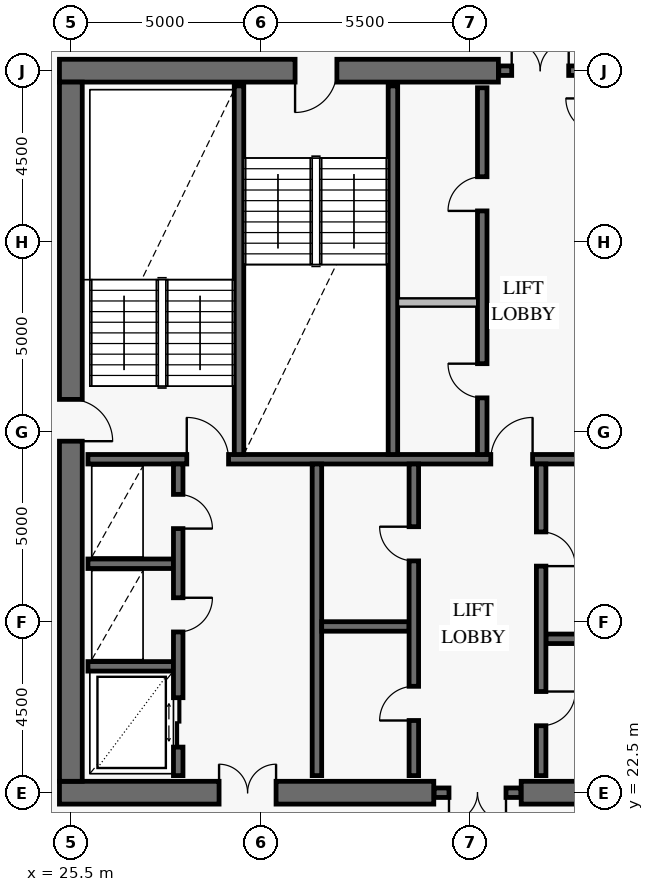
"""IFC4 building model, lengths in metres.
Left out: names, types, materials, properties, quantities, classifications, styles, units other than length and angle.
Written with IfcOpenShell. Run it as: python <this file> out.ifc"""

import sys

from ifc_helpers import new_model, si_unit, direction, frame, frame_2d, origin, place, context, subcontext, project, spatial, rectangle, extrude, element, fill, save


model = new_model("IFC4")
c1 = context("Model", 3, precision=1e-05, world=origin(), true_north=direction((0.0, 1.0)))
c2 = subcontext(c1, "Body", "Model", "MODEL_VIEW")
j1 = project(units=[si_unit("LENGTHUNIT", "METRE"), si_unit("PLANEANGLEUNIT", "RADIAN")], contexts=[c1])
p1 = place(None, origin())
s1 = spatial("IfcSite", under=j1, at=p1, CompositionType="ELEMENT")
p2 = place(p1, origin())
s2 = spatial("IfcBuilding", under=s1, at=p2, CompositionType="ELEMENT")
p3 = place(p2, frame((0.0, 0.0, 276.8)))
s3 = spatial("IfcBuildingStorey", under=s2, at=p3, CompositionType="ELEMENT", Elevation=276.8)
p4 = place(p3, frame((25.2, 22.5, 0.0), z_axis=(0.0, 0.0, 1.0), x_axis=(1.0, 0.0, 0.0)))
e1 = element("IfcWall", 1, at=p4, inside=s3, PredefinedType="SHEAR", context=c2, shape_type="SweptSolid", body=[
    extrude(rectangle(XDim=9.85, YDim=0.6, at=frame_2d((4.925, 0.0))), origin(), (0.0, 0.0, 1.0), 3.8),
])
p5 = place(p4, frame((4.2, 0.0, 0.0)))
e2 = element("IfcOpeningElement", 2, at=p5, cuts=e1, PredefinedType="OPENING", context=c2, shape_type="SweptSolid", body=[
    extrude(rectangle(XDim=1.5, YDim=2.15, at=frame_2d((0.75, 1.075))), frame((0.0, 0.312, 0.0), z_axis=(0.0, -1.0, 0.0), x_axis=(1.0, 0.0, 0.0)), (0.0, 0.0, 1.0), 0.624),
])
p6 = place(p3, frame((37.35, 22.5, 0.0), z_axis=(0.0, 0.0, 1.0), x_axis=(1.0, 0.0, 0.0)))
e3 = element("IfcWall", 3, at=p6, inside=s3, PredefinedType="SHEAR", context=c2, shape_type="SweptSolid", body=[
    extrude(rectangle(XDim=9.45, YDim=0.6, at=frame_2d((4.725, 0.0))), origin(), (0.0, 0.0, 1.0), 3.8),
])
p7 = place(p6, frame((3.95, 0.0, 0.0)))
e4 = element("IfcOpeningElement", 4, at=p7, cuts=e3, PredefinedType="OPENING", context=c2, shape_type="SweptSolid", body=[
    extrude(rectangle(XDim=1.5, YDim=2.15, at=frame_2d((0.75, 1.075))), frame((0.0, 0.312, 0.0), z_axis=(0.0, -1.0, 0.0), x_axis=(1.0, 0.0, 0.0)), (0.0, 0.0, 1.0), 0.624),
])
p8 = place(p3, frame((36.75, 41.5, 0.0), z_axis=(0.0, 0.0, 1.0), x_axis=(-1.0, 0.0, 0.0)))
e5 = element("IfcWall", 5, at=p8, inside=s3, PredefinedType="SHEAR", context=c2, shape_type="SweptSolid", body=[
    extrude(rectangle(XDim=11.55, YDim=0.6, at=frame_2d((5.775, 0.0))), origin(), (0.0, 0.0, 1.0), 3.8),
])
p9 = place(p8, frame((4.25, 0.0, 0.0)))
e6 = element("IfcOpeningElement", 6, at=p9, cuts=e5, PredefinedType="OPENING", context=c2, shape_type="SweptSolid", body=[
    extrude(rectangle(XDim=1.1, YDim=2.15, at=frame_2d((0.55, 1.075))), frame((0.0, 0.312, 0.0), z_axis=(0.0, -1.0, 0.0), x_axis=(1.0, 0.0, 0.0)), (0.0, 0.0, 1.0), 0.624),
])
p10 = place(p3, frame((25.5, 22.8, 0.0), z_axis=(0.0, 0.0, 1.0), x_axis=(0.0, 1.0, 0.0)))
e7 = element("IfcWall", 7, at=p10, inside=s3, PredefinedType="SHEAR", context=c2, shape_type="SweptSolid", body=[
    extrude(rectangle(XDim=18.4, YDim=0.6, at=frame_2d((9.2, 0.0))), origin(), (0.0, 0.0, 1.0), 3.8),
])
p11 = place(p10, frame((8.95, 0.0, 0.0)))
e8 = element("IfcOpeningElement", 8, at=p11, cuts=e7, PredefinedType="OPENING", context=c2, shape_type="SweptSolid", body=[
    extrude(rectangle(XDim=1.1, YDim=2.15, at=frame_2d((0.55, 1.075))), frame((0.0, 0.312, 0.0), z_axis=(0.0, -1.0, 0.0), x_axis=(1.0, 0.0, 0.0)), (0.0, 0.0, 1.0), 0.624),
])
p12 = place(p3, frame((35.06, 22.5, 0.0), z_axis=(0.0, 0.0, 1.0), x_axis=(1.0, 0.0, 0.0)))
e9 = element("IfcWall", 9, at=p12, inside=s3, PredefinedType="SOLIDWALL", context=c2, shape_type="SweptSolid", body=[
    extrude(rectangle(XDim=2.28, YDim=0.25, at=frame_2d((1.14, 0.0))), origin(), (0.0, 0.0, 1.0), 3.8),
])
p13 = place(p12, frame((0.39, 0.0, 0.0)))
e10 = element("IfcOpeningElement", 10, at=p13, cuts=e9, PredefinedType="OPENING", context=c2, shape_type="SweptSolid", body=[
    extrude(rectangle(XDim=1.5, YDim=2.15, at=frame_2d((0.75, 1.075))), frame((0.0, 0.137, 0.0), z_axis=(0.0, -1.0, 0.0), x_axis=(1.0, 0.0, 0.0)), (0.0, 0.0, 1.0), 0.274),
])
p14 = place(p3, frame((36.76, 41.5, 0.0), z_axis=(0.0, 0.0, 1.0), x_axis=(1.0, 0.0, 0.0)))
e11 = element("IfcWall", 11, at=p14, inside=s3, PredefinedType="SOLIDWALL", context=c2, shape_type="SweptSolid", body=[
    extrude(rectangle(XDim=2.18, YDim=0.25, at=frame_2d((1.09, 0.0))), origin(), (0.0, 0.0, 1.0), 3.8),
])
p15 = place(p14, frame((0.34, 0.0, 0.0)))
e12 = element("IfcOpeningElement", 12, at=p15, cuts=e11, PredefinedType="OPENING", context=c2, shape_type="SweptSolid", body=[
    extrude(rectangle(XDim=1.5, YDim=2.15, at=frame_2d((0.75, 1.075))), frame((0.0, 0.137, 0.0), z_axis=(0.0, -1.0, 0.0), x_axis=(1.0, 0.0, 0.0)), (0.0, 0.0, 1.0), 0.274),
])
p16 = place(p3, frame((25.95, 31.275, 0.0), z_axis=(0.0, 0.0, 1.0), x_axis=(1.0, 0.0, 0.0)))
e13 = element("IfcWall", 13, at=p16, inside=s3, PredefinedType="SOLIDWALL", context=c2, shape_type="SweptSolid", body=[
    extrude(rectangle(XDim=20.1, YDim=0.25, at=frame_2d((10.05, 0.0))), origin(), (0.0, 0.0, 1.0), 3.8),
])
p17 = place(p16, frame((2.6, 0.0, 0.0)))
e14 = element("IfcOpeningElement", 14, at=p17, cuts=e13, PredefinedType="OPENING", context=c2, shape_type="SweptSolid", body=[
    extrude(rectangle(XDim=1.1, YDim=2.15, at=frame_2d((0.55, 1.075))), frame((0.0, 0.137, 0.0), z_axis=(0.0, -1.0, 0.0), x_axis=(1.0, 0.0, 0.0)), (0.0, 0.0, 1.0), 0.274),
])
p18 = place(p16, frame((10.6, 0.0, 0.0)))
e15 = element("IfcOpeningElement", 15, at=p18, cuts=e13, PredefinedType="OPENING", context=c2, shape_type="SweptSolid", body=[
    extrude(rectangle(XDim=1.1, YDim=2.15, at=frame_2d((0.55, 1.075))), frame((0.0, 0.137, 0.0), z_axis=(0.0, -1.0, 0.0), x_axis=(1.0, 0.0, 0.0)), (0.0, 0.0, 1.0), 0.274),
])
p19 = place(p16, frame((16.35, 0.0, 0.0)))
e16 = element("IfcOpeningElement", 16, at=p19, cuts=e13, PredefinedType="OPENING", context=c2, shape_type="SweptSolid", body=[
    extrude(rectangle(XDim=1.1, YDim=2.15, at=frame_2d((0.55, 1.075))), frame((0.0, 0.137, 0.0), z_axis=(0.0, -1.0, 0.0), x_axis=(1.0, 0.0, 0.0)), (0.0, 0.0, 1.0), 0.274),
])
for number, where, z_axis, x_axis in (
    (17, (29.925, 31.4, 0.0), (0.0, 0.0, 1.0), (0.0, 1.0, 0.0)),
    (18, (33.975, 31.4, 0.0), (0.0, 0.0, 1.0), (0.0, 1.0, 0.0)),
):
    element("IfcWall", number, at=place(p3, frame(where, z_axis=z_axis, x_axis=x_axis)), inside=s3, PredefinedType="SOLIDWALL", context=c2, shape_type="SweptSolid", body=[
        extrude(rectangle(XDim=9.7, YDim=0.25, at=frame_2d((4.85, 0.0))), origin(), (0.0, 0.0, 1.0), 3.8),
    ])
p20 = place(p3, frame((36.325, 31.4, 0.0), z_axis=(0.0, 0.0, 1.0), x_axis=(0.0, 1.0, 0.0)))
e19 = element("IfcWall", 19, at=p20, inside=s3, PredefinedType="SOLIDWALL", context=c2, shape_type="SweptSolid", body=[
    extrude(rectangle(XDim=9.65, YDim=0.25, at=frame_2d((4.825, 0.0))), origin(), (0.0, 0.0, 1.0), 3.8),
])
p21 = place(p20, frame((1.49, 0.0, 0.0)))
e20 = element("IfcOpeningElement", 20, at=p21, cuts=e19, PredefinedType="OPENING", context=c2, shape_type="SweptSolid", body=[
    extrude(rectangle(XDim=0.9, YDim=2.1, at=frame_2d((0.45, 1.05))), frame((0.0, 0.137, 0.0), z_axis=(0.0, -1.0, 0.0), x_axis=(1.0, 0.0, 0.0)), (0.0, 0.0, 1.0), 0.274),
])
p22 = place(p20, frame((6.41, 0.0, 0.0)))
e21 = element("IfcOpeningElement", 21, at=p22, cuts=e19, PredefinedType="OPENING", context=c2, shape_type="SweptSolid", body=[
    extrude(rectangle(XDim=0.9, YDim=2.1, at=frame_2d((0.45, 1.05))), frame((0.0, 0.137, 0.0), z_axis=(0.0, -1.0, 0.0), x_axis=(1.0, 0.0, 0.0)), (0.0, 0.0, 1.0), 0.274),
])
for number, where, z_axis, x_axis in (
    (22, (25.95, 25.825, 0.0), (0.0, 0.0, 1.0), (1.0, 0.0, 0.0)),
    (23, (25.95, 28.525, 0.0), (0.0, 0.0, 1.0), (1.0, 0.0, 0.0)),
):
    element("IfcWall", number, at=place(p3, frame(where, z_axis=z_axis, x_axis=x_axis)), inside=s3, PredefinedType="SOLIDWALL", context=c2, shape_type="SweptSolid", body=[
        extrude(rectangle(XDim=2.25, YDim=0.25, at=frame_2d((1.125, 0.0))), origin(), (0.0, 0.0, 1.0), 3.8),
    ])
p23 = place(p3, frame((28.325, 22.95, 0.0), z_axis=(0.0, 0.0, 1.0), x_axis=(0.0, 1.0, 0.0)))
e24 = element("IfcWall", 24, at=p23, inside=s3, PredefinedType="SOLIDWALL", context=c2, shape_type="SweptSolid", body=[
    extrude(rectangle(XDim=8.2, YDim=0.25, at=frame_2d((4.1, 0.0))), origin(), (0.0, 0.0, 1.0), 3.8),
])
p24 = place(p23, frame((0.75, 0.0, 0.0)))
e25 = element("IfcOpeningElement", 25, at=p24, cuts=e24, PredefinedType="OPENING", context=c2, shape_type="SweptSolid", body=[
    extrude(rectangle(XDim=1.3, YDim=2.3, at=frame_2d((0.65, 1.15))), frame((0.0, 0.137, 0.0), z_axis=(0.0, -1.0, 0.0), x_axis=(1.0, 0.0, 0.0)), (0.0, 0.0, 1.0), 0.274),
])
p25 = place(p23, frame((3.78, 0.0, 0.0)))
e26 = element("IfcOpeningElement", 26, at=p25, cuts=e24, PredefinedType="OPENING", context=c2, shape_type="SweptSolid", body=[
    extrude(rectangle(XDim=0.9, YDim=2.1, at=frame_2d((0.45, 1.05))), frame((0.0, 0.137, 0.0), z_axis=(0.0, -1.0, 0.0), x_axis=(1.0, 0.0, 0.0)), (0.0, 0.0, 1.0), 0.274),
])
p26 = place(p23, frame((6.5, 0.0, 0.0)))
e27 = element("IfcOpeningElement", 27, at=p26, cuts=e24, PredefinedType="OPENING", context=c2, shape_type="SweptSolid", body=[
    extrude(rectangle(XDim=0.9, YDim=2.1, at=frame_2d((0.45, 1.05))), frame((0.0, 0.137, 0.0), z_axis=(0.0, -1.0, 0.0), x_axis=(1.0, 0.0, 0.0)), (0.0, 0.0, 1.0), 0.274),
])
p27 = place(p3, frame((31.975, 22.95, 0.0), z_axis=(0.0, 0.0, 1.0), x_axis=(0.0, 1.0, 0.0)))
e28 = element("IfcWall", 28, at=p27, inside=s3, PredefinedType="SOLIDWALL", context=c2, shape_type="SweptSolid", body=[
    extrude(rectangle(XDim=8.2, YDim=0.25, at=frame_2d((4.1, 0.0))), origin(), (0.0, 0.0, 1.0), 3.8),
])
p28 = place(p3, frame((32.1, 26.875, 0.0), z_axis=(0.0, 0.0, 1.0), x_axis=(1.0, 0.0, 0.0)))
e29 = element("IfcWall", 29, at=p28, inside=s3, PredefinedType="SOLIDWALL", context=c2, shape_type="SweptSolid", body=[
    extrude(rectangle(XDim=2.3, YDim=0.25, at=frame_2d((1.15, 0.0))), origin(), (0.0, 0.0, 1.0), 3.8),
])
p29 = place(p3, frame((34.525, 22.95, 0.0), z_axis=(0.0, 0.0, 1.0), x_axis=(0.0, 1.0, 0.0)))
e30 = element("IfcWall", 30, at=p29, inside=s3, PredefinedType="SOLIDWALL", context=c2, shape_type="SweptSolid", body=[
    extrude(rectangle(XDim=8.2, YDim=0.25, at=frame_2d((4.1, 0.0))), origin(), (0.0, 0.0, 1.0), 3.8),
])
p30 = place(p29, frame((1.45, 0.0, 0.0)))
e31 = element("IfcOpeningElement", 31, at=p30, cuts=e30, PredefinedType="OPENING", context=c2, shape_type="SweptSolid", body=[
    extrude(rectangle(XDim=0.9, YDim=2.1, at=frame_2d((0.45, 1.05))), frame((0.0, 0.137, 0.0), z_axis=(0.0, -1.0, 0.0), x_axis=(1.0, 0.0, 0.0)), (0.0, 0.0, 1.0), 0.274),
])
p31 = place(p29, frame((5.65, 0.0, 0.0)))
e32 = element("IfcOpeningElement", 32, at=p31, cuts=e30, PredefinedType="OPENING", context=c2, shape_type="SweptSolid", body=[
    extrude(rectangle(XDim=0.9, YDim=2.1, at=frame_2d((0.45, 1.05))), frame((0.0, 0.137, 0.0), z_axis=(0.0, -1.0, 0.0), x_axis=(1.0, 0.0, 0.0)), (0.0, 0.0, 1.0), 0.274),
])
p32 = place(p3, frame((38.0, 26.55, 0.0), z_axis=(0.0, 0.0, 1.0), x_axis=(1.0, 0.0, 0.0)))
e33 = element("IfcWall", 33, at=p32, inside=s3, PredefinedType="SOLIDWALL", context=c2, shape_type="SweptSolid", body=[
    extrude(rectangle(XDim=2.3, YDim=0.25, at=frame_2d((1.15, 0.0))), origin(), (0.0, 0.0, 1.0), 3.8),
])
p33 = place(p3, frame((37.875, 22.95, 0.0), z_axis=(0.0, 0.0, 1.0), x_axis=(0.0, 1.0, 0.0)))
e34 = element("IfcWall", 34, at=p33, inside=s3, PredefinedType="SOLIDWALL", context=c2, shape_type="SweptSolid", body=[
    extrude(rectangle(XDim=8.2, YDim=0.25, at=frame_2d((4.1, 0.0))), origin(), (0.0, 0.0, 1.0), 3.8),
])
p34 = place(p33, frame((1.312, 0.0, 0.0)))
e35 = element("IfcOpeningElement", 35, at=p34, cuts=e34, PredefinedType="OPENING", context=c2, shape_type="SweptSolid", body=[
    extrude(rectangle(XDim=0.9, YDim=2.1, at=frame_2d((0.45, 1.05))), frame((0.0, 0.137, 0.0), z_axis=(0.0, -1.0, 0.0), x_axis=(1.0, 0.0, 0.0)), (0.0, 0.0, 1.0), 0.274),
])
p35 = place(p33, frame((5.512, 0.0, 0.0)))
e36 = element("IfcOpeningElement", 36, at=p35, cuts=e34, PredefinedType="OPENING", context=c2, shape_type="SweptSolid", body=[
    extrude(rectangle(XDim=0.9, YDim=2.1, at=frame_2d((0.45, 1.05))), frame((0.0, 0.137, 0.0), z_axis=(0.0, -1.0, 0.0), x_axis=(1.0, 0.0, 0.0)), (0.0, 0.0, 1.0), 0.274),
])
p36 = place(p3, frame((34.108, 35.4, 0.0), z_axis=(0.0, 0.0, 1.0), x_axis=(1.0, 0.0, 0.0)))
e37 = element("IfcWall", 37, at=p36, inside=s3, PredefinedType="PARTITIONING", context=c2, shape_type="SweptSolid", body=[
    extrude(rectangle(XDim=2.084, YDim=0.22, at=frame_2d((1.042, 0.0))), origin(), (0.0, 0.0, 1.0), 3.55),
])
p37 = place(p11, frame((1.1, 0.0, 0.0), z_axis=(0.0, 0.0, 1.0), x_axis=(-1.0, 0.0, 0.0)))
e38 = element("IfcDoor", 38, at=p37, inside=s3, OperationType="SINGLE_SWING_RIGHT", PredefinedType="USERDEFINED", context=c2, shape_type="SweptSolid", body=[
    extrude(rectangle(XDim=1.1, YDim=2.15, at=frame_2d((0.55, 1.075))), frame((0.0, 0.025, 0.0), z_axis=(0.0, -1.0, 0.0), x_axis=(1.0, 0.0, 0.0)), (0.0, 0.0, 1.0), 0.05),
])
fill(e8, e38)
p38 = place(p9, origin())
e39 = element("IfcDoor", 39, at=p38, inside=s3, OperationType="SINGLE_SWING_RIGHT", PredefinedType="USERDEFINED", context=c2, shape_type="SweptSolid", body=[
    extrude(rectangle(XDim=1.1, YDim=2.15, at=frame_2d((0.55, 1.075))), frame((0.0, 0.025, 0.0), z_axis=(0.0, -1.0, 0.0), x_axis=(1.0, 0.0, 0.0)), (0.0, 0.0, 1.0), 0.05),
])
fill(e6, e39)
p39 = place(p5, origin())
e40 = element("IfcDoor", 40, at=p39, inside=s3, OperationType="DOUBLE_DOOR_SINGLE_SWING", PredefinedType="DOOR", context=c2, shape_type="SweptSolid", body=[
    extrude(rectangle(XDim=1.5, YDim=2.15, at=frame_2d((0.75, 1.075))), frame((0.0, 0.025, 0.0), z_axis=(0.0, -1.0, 0.0), x_axis=(1.0, 0.0, 0.0)), (0.0, 0.0, 1.0), 0.05),
])
fill(e2, e40)
p40 = place(p13, frame((1.5, 0.0, 0.0), z_axis=(0.0, 0.0, 1.0), x_axis=(-1.0, 0.0, 0.0)))
e41 = element("IfcDoor", 41, at=p40, inside=s3, OperationType="DOUBLE_DOOR_SINGLE_SWING", PredefinedType="DOOR", context=c2, shape_type="SweptSolid", body=[
    extrude(rectangle(XDim=1.5, YDim=2.15, at=frame_2d((0.75, 1.075))), frame((0.0, 0.025, 0.0), z_axis=(0.0, -1.0, 0.0), x_axis=(1.0, 0.0, 0.0)), (0.0, 0.0, 1.0), 0.05),
])
fill(e10, e41)
p41 = place(p15, origin())
e42 = element("IfcDoor", 42, at=p41, inside=s3, OperationType="DOUBLE_DOOR_SINGLE_SWING", PredefinedType="DOOR", context=c2, shape_type="SweptSolid", body=[
    extrude(rectangle(XDim=1.5, YDim=2.15, at=frame_2d((0.75, 1.075))), frame((0.0, 0.025, 0.0), z_axis=(0.0, -1.0, 0.0), x_axis=(1.0, 0.0, 0.0)), (0.0, 0.0, 1.0), 0.05),
])
fill(e12, e42)
p42 = place(p17, origin())
e43 = element("IfcDoor", 43, at=p42, inside=s3, OperationType="SINGLE_SWING_LEFT", PredefinedType="USERDEFINED", context=c2, shape_type="SweptSolid", body=[
    extrude(rectangle(XDim=1.1, YDim=2.15, at=frame_2d((0.55, 1.075))), frame((0.0, 0.025, 0.0), z_axis=(0.0, -1.0, 0.0), x_axis=(1.0, 0.0, 0.0)), (0.0, 0.0, 1.0), 0.05),
])
fill(e14, e43)
p43 = place(p18, origin())
e44 = element("IfcDoor", 44, at=p43, inside=s3, OperationType="SINGLE_SWING_RIGHT", PredefinedType="USERDEFINED", context=c2, shape_type="SweptSolid", body=[
    extrude(rectangle(XDim=1.1, YDim=2.15, at=frame_2d((0.55, 1.075))), frame((0.0, 0.025, 0.0), z_axis=(0.0, -1.0, 0.0), x_axis=(1.0, 0.0, 0.0)), (0.0, 0.0, 1.0), 0.05),
])
fill(e15, e44)
p44 = place(p21, origin())
e45 = element("IfcDoor", 45, at=p44, inside=s3, OperationType="SINGLE_SWING_RIGHT", PredefinedType="DOOR", context=c2, shape_type="SweptSolid", body=[
    extrude(rectangle(XDim=0.9, YDim=2.1, at=frame_2d((0.45, 1.05))), frame((0.0, 0.025, 0.0), z_axis=(0.0, -1.0, 0.0), x_axis=(1.0, 0.0, 0.0)), (0.0, 0.0, 1.0), 0.05),
])
fill(e20, e45)
p45 = place(p22, origin())
e46 = element("IfcDoor", 46, at=p45, inside=s3, OperationType="SINGLE_SWING_LEFT", PredefinedType="DOOR", context=c2, shape_type="SweptSolid", body=[
    extrude(rectangle(XDim=0.9, YDim=2.1, at=frame_2d((0.45, 1.05))), frame((0.0, 0.025, 0.0), z_axis=(0.0, -1.0, 0.0), x_axis=(1.0, 0.0, 0.0)), (0.0, 0.0, 1.0), 0.05),
])
fill(e21, e46)
p46 = place(p24, frame((1.3, 0.0, 0.0), z_axis=(0.0, 0.0, 1.0), x_axis=(-1.0, 0.0, 0.0)))
e47 = element("IfcDoor", 47, at=p46, inside=s3, OperationType="DOUBLE_DOOR_SLIDING", PredefinedType="DOOR", context=c2, shape_type="SweptSolid", body=[
    extrude(rectangle(XDim=1.3, YDim=2.3, at=frame_2d((0.65, 1.15))), frame((0.0, 0.025, 0.0), z_axis=(0.0, -1.0, 0.0), x_axis=(1.0, 0.0, 0.0)), (0.0, 0.0, 1.0), 0.05),
])
fill(e25, e47)
p47 = place(p25, frame((0.9, 0.0, 0.0), z_axis=(0.0, 0.0, 1.0), x_axis=(-1.0, 0.0, 0.0)))
e48 = element("IfcDoor", 48, at=p47, inside=s3, OperationType="SINGLE_SWING_LEFT", PredefinedType="DOOR", context=c2, shape_type="SweptSolid", body=[
    extrude(rectangle(XDim=0.9, YDim=2.1, at=frame_2d((0.45, 1.05))), frame((0.0, 0.025, 0.0), z_axis=(0.0, -1.0, 0.0), x_axis=(1.0, 0.0, 0.0)), (0.0, 0.0, 1.0), 0.05),
])
fill(e26, e48)
p48 = place(p26, frame((0.9, 0.0, 0.0), z_axis=(0.0, 0.0, 1.0), x_axis=(-1.0, 0.0, 0.0)))
e49 = element("IfcDoor", 49, at=p48, inside=s3, OperationType="SINGLE_SWING_RIGHT", PredefinedType="DOOR", context=c2, shape_type="SweptSolid", body=[
    extrude(rectangle(XDim=0.9, YDim=2.1, at=frame_2d((0.45, 1.05))), frame((0.0, 0.025, 0.0), z_axis=(0.0, -1.0, 0.0), x_axis=(1.0, 0.0, 0.0)), (0.0, 0.0, 1.0), 0.05),
])
fill(e27, e49)
p49 = place(p30, origin())
e50 = element("IfcDoor", 50, at=p49, inside=s3, OperationType="SINGLE_SWING_LEFT", PredefinedType="DOOR", context=c2, shape_type="SweptSolid", body=[
    extrude(rectangle(XDim=0.9, YDim=2.1, at=frame_2d((0.45, 1.05))), frame((0.0, 0.025, 0.0), z_axis=(0.0, -1.0, 0.0), x_axis=(1.0, 0.0, 0.0)), (0.0, 0.0, 1.0), 0.05),
])
fill(e31, e50)
p50 = place(p31, origin())
e51 = element("IfcDoor", 51, at=p50, inside=s3, OperationType="SINGLE_SWING_RIGHT", PredefinedType="DOOR", context=c2, shape_type="SweptSolid", body=[
    extrude(rectangle(XDim=0.9, YDim=2.1, at=frame_2d((0.45, 1.05))), frame((0.0, 0.025, 0.0), z_axis=(0.0, -1.0, 0.0), x_axis=(1.0, 0.0, 0.0)), (0.0, 0.0, 1.0), 0.05),
])
fill(e32, e51)
p51 = place(p34, frame((0.9, 0.0, 0.0), z_axis=(0.0, 0.0, 1.0), x_axis=(-1.0, 0.0, 0.0)))
e52 = element("IfcDoor", 52, at=p51, inside=s3, OperationType="SINGLE_SWING_LEFT", PredefinedType="DOOR", context=c2, shape_type="SweptSolid", body=[
    extrude(rectangle(XDim=0.9, YDim=2.1, at=frame_2d((0.45, 1.05))), frame((0.0, 0.025, 0.0), z_axis=(0.0, -1.0, 0.0), x_axis=(1.0, 0.0, 0.0)), (0.0, 0.0, 1.0), 0.05),
])
fill(e35, e52)
p52 = place(p35, frame((0.9, 0.0, 0.0), z_axis=(0.0, 0.0, 1.0), x_axis=(-1.0, 0.0, 0.0)))
e53 = element("IfcDoor", 53, at=p52, inside=s3, OperationType="SINGLE_SWING_RIGHT", PredefinedType="DOOR", context=c2, shape_type="SweptSolid", body=[
    extrude(rectangle(XDim=0.9, YDim=2.1, at=frame_2d((0.45, 1.05))), frame((0.0, 0.025, 0.0), z_axis=(0.0, -1.0, 0.0), x_axis=(1.0, 0.0, 0.0)), (0.0, 0.0, 1.0), 0.05),
])
fill(e36, e53)
save(model, sys.argv[1])
